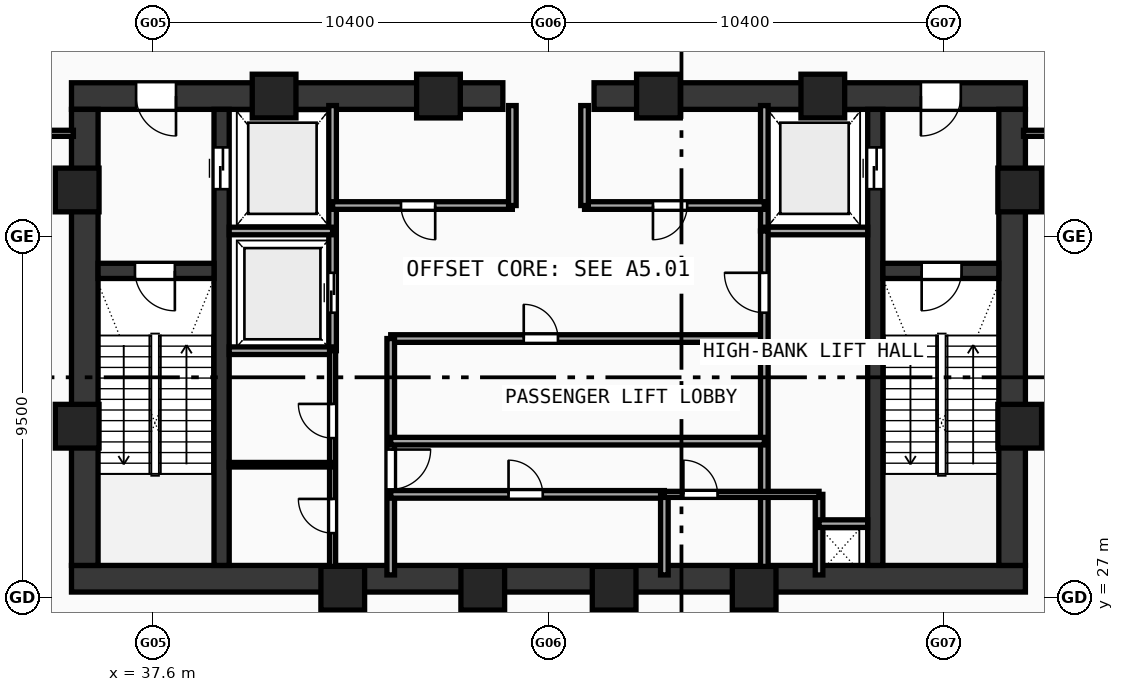
"""IFC4 building model, lengths in metres.
Left out: names, types, materials, properties, quantities, classifications, styles, units other than length and angle.
Written with IfcOpenShell. Run it as: python <this file> out.ifc"""

import sys

from ifc_helpers import new_model, si_unit, direction, frame, frame_2d, origin, origin_with_axes, origin_2d, place, context, subcontext, project, spatial, rectangle, hollow_rectangle, extrude, source, transform, mapped, element, fill, save


model = new_model("IFC4")
c1 = context("Model", 3, precision=1e-05, world=origin(), true_north=direction((0.0, 1.0)))
c2 = subcontext(c1, "Body", "Model", "MODEL_VIEW")
j1 = project(units=[si_unit("LENGTHUNIT", "METRE"), si_unit("PLANEANGLEUNIT", "RADIAN")], contexts=[c1])
p1 = place(None, origin())
s1 = spatial("IfcSite", under=j1, at=p1, CompositionType="ELEMENT")
p2 = place(p1, origin())
s2 = spatial("IfcBuilding", under=s1, at=p2, CompositionType="ELEMENT")
p3 = place(p2, frame((0.0, 0.0, -4.8)))
s3 = spatial("IfcBuildingStorey", under=s2, at=p3, CompositionType="ELEMENT", Elevation=-4.8)
p4 = place(p3, frame((35.45, 27.5, 0.0), z_axis=(0.0, 0.0, 1.0), x_axis=(1.0, 0.0, 0.0)))
e1 = element("IfcWall", 1, at=p4, inside=s3, PredefinedType="SHEAR", context=c2, shape_type="SweptSolid", body=[
    extrude(rectangle(XDim=25.1, YDim=0.7, at=frame_2d((12.55, 0.0))), origin(), (0.0, 0.0, 1.0), 4.52),
])
p5 = place(p3, frame((35.45, 40.2, 0.0), z_axis=(0.0, 0.0, 1.0), x_axis=(1.0, 0.0, 0.0)))
e2 = element("IfcWall", 2, at=p5, inside=s3, PredefinedType="SHEAR", context=c2, shape_type="SweptSolid", body=[
    extrude(rectangle(XDim=11.35, YDim=0.7, at=frame_2d((5.675, 0.0))), origin(), (0.0, 0.0, 1.0), 4.52),
])
p6 = place(p5, frame((1.7, 0.0, 0.0)))
e3 = element("IfcOpeningElement", 3, at=p6, cuts=e2, PredefinedType="OPENING", context=c2, shape_type="SweptSolid", body=[
    extrude(rectangle(XDim=1.05, YDim=2.1, at=frame_2d((0.525, 1.05))), frame((0.0, 0.36, 0.0), z_axis=(0.0, -1.0, 0.0), x_axis=(1.0, 0.0, 0.0)), (0.0, 0.0, 1.0), 0.72),
])
p7 = place(p3, frame((49.2, 40.2, 0.0), z_axis=(0.0, 0.0, 1.0), x_axis=(1.0, 0.0, 0.0)))
e4 = element("IfcWall", 4, at=p7, inside=s3, PredefinedType="SHEAR", context=c2, shape_type="SweptSolid", body=[
    extrude(rectangle(XDim=11.35, YDim=0.7, at=frame_2d((5.675, 0.0))), origin(), (0.0, 0.0, 1.0), 4.52),
])
p8 = place(p7, frame((8.6, 0.0, 0.0)))
e5 = element("IfcOpeningElement", 5, at=p8, cuts=e4, PredefinedType="OPENING", context=c2, shape_type="SweptSolid", body=[
    extrude(rectangle(XDim=1.05, YDim=2.1, at=frame_2d((0.525, 1.05))), frame((0.0, 0.36, 0.0), z_axis=(0.0, -1.0, 0.0), x_axis=(1.0, 0.0, 0.0)), (0.0, 0.0, 1.0), 0.72),
])
for number, where, z_axis, x_axis in (
    (6, (35.8, 27.85, 0.0), (0.0, 0.0, 1.0), (0.0, 1.0, 0.0)),
    (7, (60.2, 27.85, 0.0), (0.0, 0.0, 1.0), (0.0, 1.0, 0.0)),
):
    element("IfcWall", number, at=place(p3, frame(where, z_axis=z_axis, x_axis=x_axis)), inside=s3, PredefinedType="SHEAR", context=c2, shape_type="SweptSolid", body=[
        extrude(rectangle(XDim=12.0, YDim=0.7, at=frame_2d((6.0, 0.0))), origin(), (0.0, 0.0, 1.0), 4.52),
    ])
p9 = place(p3, frame((39.4, 27.85, 0.0), z_axis=(0.0, 0.0, 1.0), x_axis=(0.0, 1.0, 0.0)))
e8 = element("IfcWall", 8, at=p9, inside=s3, PredefinedType="SHEAR", context=c2, shape_type="SweptSolid", body=[
    extrude(rectangle(XDim=12.0, YDim=0.4, at=frame_2d((6.0, 0.0))), origin(), (0.0, 0.0, 1.0), 4.52),
])
p10 = place(p9, frame((9.9, 0.0, 0.0)))
e9 = element("IfcOpeningElement", 9, at=p10, cuts=e8, PredefinedType="OPENING", context=c2, shape_type="SweptSolid", body=[
    extrude(rectangle(XDim=1.1, YDim=2.1, at=frame_2d((0.55, 1.05))), frame((0.0, 0.21, 0.0), z_axis=(0.0, -1.0, 0.0), x_axis=(1.0, 0.0, 0.0)), (0.0, 0.0, 1.0), 0.42),
])
p11 = place(p3, frame((56.6, 27.85, 0.0), z_axis=(0.0, 0.0, 1.0), x_axis=(0.0, 1.0, 0.0)))
e10 = element("IfcWall", 10, at=p11, inside=s3, PredefinedType="SHEAR", context=c2, shape_type="SweptSolid", body=[
    extrude(rectangle(XDim=12.0, YDim=0.4, at=frame_2d((6.0, 0.0))), origin(), (0.0, 0.0, 1.0), 4.52),
])
p12 = place(p11, frame((9.9, 0.0, 0.0)))
e11 = element("IfcOpeningElement", 11, at=p12, cuts=e10, PredefinedType="OPENING", context=c2, shape_type="SweptSolid", body=[
    extrude(rectangle(XDim=1.1, YDim=2.1, at=frame_2d((0.55, 1.05))), frame((0.0, 0.21, 0.0), z_axis=(0.0, -1.0, 0.0), x_axis=(1.0, 0.0, 0.0)), (0.0, 0.0, 1.0), 0.42),
])
p13 = place(p3, frame((36.15, 35.6, 0.0), z_axis=(0.0, 0.0, 1.0), x_axis=(1.0, 0.0, 0.0)))
e12 = element("IfcWall", 12, at=p13, inside=s3, PredefinedType="SHEAR", context=c2, shape_type="SweptSolid", body=[
    extrude(rectangle(XDim=3.05, YDim=0.4, at=frame_2d((1.525, 0.0))), origin(), (0.0, 0.0, 1.0), 4.52),
])
p14 = place(p13, frame((0.97, 0.0, 0.0)))
e13 = element("IfcOpeningElement", 13, at=p14, cuts=e12, PredefinedType="OPENING", context=c2, shape_type="SweptSolid", body=[
    extrude(rectangle(XDim=1.05, YDim=2.1, at=frame_2d((0.525, 1.05))), frame((0.0, 0.21, 0.0), z_axis=(0.0, -1.0, 0.0), x_axis=(1.0, 0.0, 0.0)), (0.0, 0.0, 1.0), 0.42),
])
p15 = place(p3, frame((56.8, 35.6, 0.0), z_axis=(0.0, 0.0, 1.0), x_axis=(1.0, 0.0, 0.0)))
e14 = element("IfcWall", 14, at=p15, inside=s3, PredefinedType="SHEAR", context=c2, shape_type="SweptSolid", body=[
    extrude(rectangle(XDim=3.05, YDim=0.4, at=frame_2d((1.525, 0.0))), origin(), (0.0, 0.0, 1.0), 4.52),
])
p16 = place(p15, frame((1.02, 0.0, 0.0)))
e15 = element("IfcOpeningElement", 15, at=p16, cuts=e14, PredefinedType="OPENING", context=c2, shape_type="SweptSolid", body=[
    extrude(rectangle(XDim=1.05, YDim=2.1, at=frame_2d((0.525, 1.05))), frame((0.0, 0.21, 0.0), z_axis=(0.0, -1.0, 0.0), x_axis=(1.0, 0.0, 0.0)), (0.0, 0.0, 1.0), 0.42),
])
m1 = source(origin(), c2, "Body", "SweptSolid", [
    extrude(hollow_rectangle(XDim=1.15, YDim=1.15, WallThickness=0.048, at=origin_2d()), origin(), (0.0, 0.0, 1.0), 4.82),
])
for number, where, z_axis, x_axis in (
    (16, (42.588, 27.25, -0.3), (0.0, 0.0, 1.0), (1.0, 0.0, 0.0)),
    (17, (46.272, 27.25, -0.3), (0.0, 0.0, 1.0), (1.0, 0.0, 0.0)),
    (18, (49.729, 27.25, -0.3), (0.0, 0.0, 1.0), (1.0, 0.0, 0.0)),
    (19, (53.412, 27.25, -0.3), (0.0, 0.0, 1.0), (1.0, 0.0, 0.0)),
    (20, (60.4, 31.513, -0.3), (0.0, 0.0, 1.0), (1.0, 0.0, 0.0)),
    (21, (60.4, 37.729, -0.3), (0.0, 0.0, 1.0), (1.0, 0.0, 0.0)),
    (22, (55.219, 40.2, -0.3), (0.0, 0.0, 1.0), (1.0, 0.0, 0.0)),
    (23, (50.894, 40.2, -0.3), (0.0, 0.0, 1.0), (1.0, 0.0, 0.0)),
    (24, (45.106, 40.2, -0.3), (0.0, 0.0, 1.0), (1.0, 0.0, 0.0)),
    (25, (40.781, 40.2, -0.3), (0.0, 0.0, 1.0), (1.0, 0.0, 0.0)),
    (26, (35.6, 37.729, -0.3), (0.0, 0.0, 1.0), (1.0, 0.0, 0.0)),
    (27, (35.6, 31.513, -0.3), (0.0, 0.0, 1.0), (1.0, 0.0, 0.0)),
):
    element("IfcColumn", number, at=place(p3, frame(where, z_axis=z_axis, x_axis=x_axis)), inside=s3, PredefinedType="COLUMN", context=c2, shape_type="MappedRepresentation", body=[
        mapped(m1, transform((0.0, 0.0, 0.0), scale=1.0)),
    ])
p17 = place(p3, frame((42.32, 33.5, 0.0), z_axis=(0.0, 0.0, 1.0), x_axis=(0.0, 1.0, 0.0)))
e28 = element("IfcWall", 28, at=p17, inside=s3, PredefinedType="SOLIDWALL", context=c2, shape_type="SweptSolid", body=[
    extrude(rectangle(XDim=6.45, YDim=0.2, at=frame_2d((3.225, 0.0))), origin(), (0.0, 0.0, 1.0), 4.52),
])
p18 = place(p17, frame((1.0, 0.0, 0.0)))
e29 = element("IfcOpeningElement", 29, at=p18, cuts=e28, PredefinedType="OPENING", context=c2, shape_type="SweptSolid", body=[
    extrude(rectangle(XDim=1.05, YDim=2.1, at=frame_2d((0.525, 1.05))), frame((0.0, 0.11, 0.0), z_axis=(0.0, -1.0, 0.0), x_axis=(1.0, 0.0, 0.0)), (0.0, 0.0, 1.0), 0.22),
])
for number, where, z_axis, x_axis in (
    (30, (39.6, 36.65, 0.0), (0.0, 0.0, 1.0), (1.0, 0.0, 0.0)),
    (31, (39.6, 33.5, 0.0), (0.0, 0.0, 1.0), (1.0, 0.0, 0.0)),
):
    element("IfcWall", number, at=place(p3, frame(where, z_axis=z_axis, x_axis=x_axis)), inside=s3, PredefinedType="SOLIDWALL", context=c2, shape_type="SweptSolid", body=[
        extrude(rectangle(XDim=2.72, YDim=0.2, at=frame_2d((1.36, 0.0))), origin(), (0.0, 0.0, 1.0), 4.52),
    ])
p19 = place(p3, frame((53.68, 36.65, 0.0), z_axis=(0.0, 0.0, 1.0), x_axis=(0.0, 1.0, 0.0)))
e32 = element("IfcWall", 32, at=p19, inside=s3, PredefinedType="SOLIDWALL", context=c2, shape_type="SweptSolid", body=[
    extrude(rectangle(XDim=3.3, YDim=0.2, at=frame_2d((1.65, 0.0))), origin(), (0.0, 0.0, 1.0), 4.52),
])
p20 = place(p3, frame((53.68, 36.65, 0.0), z_axis=(0.0, 0.0, 1.0), x_axis=(1.0, 0.0, 0.0)))
e33 = element("IfcWall", 33, at=p20, inside=s3, PredefinedType="SOLIDWALL", context=c2, shape_type="SweptSolid", body=[
    extrude(rectangle(XDim=2.72, YDim=0.2, at=frame_2d((1.36, 0.0))), origin(), (0.0, 0.0, 1.0), 4.52),
])
p21 = place(p3, frame((42.32, 37.32, 0.0), z_axis=(0.0, 0.0, 1.0), x_axis=(1.0, 0.0, 0.0)))
e34 = element("IfcWall", 34, at=p21, inside=s3, PredefinedType="SOLIDWALL", context=c2, shape_type="SweptSolid", body=[
    extrude(rectangle(XDim=4.73, YDim=0.2, at=frame_2d((2.365, 0.0))), origin(), (0.0, 0.0, 1.0), 4.52),
])
p22 = place(p21, frame((1.8, 0.0, 0.0)))
e35 = element("IfcOpeningElement", 35, at=p22, cuts=e34, PredefinedType="OPENING", context=c2, shape_type="SweptSolid", body=[
    extrude(rectangle(XDim=0.9, YDim=2.1, at=frame_2d((0.45, 1.05))), frame((0.0, 0.11, 0.0), z_axis=(0.0, -1.0, 0.0), x_axis=(1.0, 0.0, 0.0)), (0.0, 0.0, 1.0), 0.22),
])
p23 = place(p3, frame((48.95, 37.32, 0.0), z_axis=(0.0, 0.0, 1.0), x_axis=(1.0, 0.0, 0.0)))
e36 = element("IfcWall", 36, at=p23, inside=s3, PredefinedType="SOLIDWALL", context=c2, shape_type="SweptSolid", body=[
    extrude(rectangle(XDim=4.73, YDim=0.2, at=frame_2d((2.365, 0.0))), origin(), (0.0, 0.0, 1.0), 4.52),
])
p24 = place(p23, frame((1.8, 0.0, 0.0)))
e37 = element("IfcOpeningElement", 37, at=p24, cuts=e36, PredefinedType="OPENING", context=c2, shape_type="SweptSolid", body=[
    extrude(rectangle(XDim=0.9, YDim=2.1, at=frame_2d((0.45, 1.05))), frame((0.0, 0.11, 0.0), z_axis=(0.0, -1.0, 0.0), x_axis=(1.0, 0.0, 0.0)), (0.0, 0.0, 1.0), 0.22),
])
for number, where, z_axis, x_axis in (
    (38, (47.05, 37.32, 0.0), (0.0, 0.0, 1.0), (0.0, 1.0, 0.0)),
    (39, (48.95, 37.32, 0.0), (0.0, 0.0, 1.0), (0.0, 1.0, 0.0)),
):
    element("IfcWall", number, at=place(p3, frame(where, z_axis=z_axis, x_axis=x_axis)), inside=s3, PredefinedType="SOLIDWALL", context=c2, shape_type="SweptSolid", body=[
        extrude(rectangle(XDim=2.63, YDim=0.2, at=frame_2d((1.315, 0.0))), origin(), (0.0, 0.0, 1.0), 4.52),
    ])
p25 = place(p3, frame((43.85, 33.82, 0.0), z_axis=(0.0, 0.0, 1.0), x_axis=(1.0, 0.0, 0.0)))
e40 = element("IfcWall", 40, at=p25, inside=s3, PredefinedType="SOLIDWALL", context=c2, shape_type="SweptSolid", body=[
    extrude(rectangle(XDim=9.83, YDim=0.2, at=frame_2d((4.915, 0.0))), origin(), (0.0, 0.0, 1.0), 4.52),
])
p26 = place(p25, frame((3.5, 0.0, 0.0)))
e41 = element("IfcOpeningElement", 41, at=p26, cuts=e40, PredefinedType="OPENING", context=c2, shape_type="SweptSolid", body=[
    extrude(rectangle(XDim=0.9, YDim=2.1, at=frame_2d((0.45, 1.05))), frame((0.0, 0.11, 0.0), z_axis=(0.0, -1.0, 0.0), x_axis=(1.0, 0.0, 0.0)), (0.0, 0.0, 1.0), 0.22),
])
p27 = place(p3, frame((43.85, 27.6, 0.0), z_axis=(0.0, 0.0, 1.0), x_axis=(0.0, 1.0, 0.0)))
e42 = element("IfcWall", 42, at=p27, inside=s3, PredefinedType="SOLIDWALL", context=c2, shape_type="SweptSolid", body=[
    extrude(rectangle(XDim=6.22, YDim=0.2, at=frame_2d((3.11, 0.0))), origin(), (0.0, 0.0, 1.0), 4.52),
])
p28 = place(p27, frame((2.25, 0.0, 0.0)))
e43 = element("IfcOpeningElement", 43, at=p28, cuts=e42, PredefinedType="OPENING", context=c2, shape_type="SweptSolid", body=[
    extrude(rectangle(XDim=1.05, YDim=2.1, at=frame_2d((0.525, 1.05))), frame((0.0, 0.11, 0.0), z_axis=(0.0, -1.0, 0.0), x_axis=(1.0, 0.0, 0.0)), (0.0, 0.0, 1.0), 0.22),
])
p29 = place(p3, frame((53.68, 27.6, 0.0), z_axis=(0.0, 0.0, 1.0), x_axis=(0.0, 1.0, 0.0)))
e44 = element("IfcWall", 44, at=p29, inside=s3, PredefinedType="SOLIDWALL", context=c2, shape_type="SweptSolid", body=[
    extrude(rectangle(XDim=9.05, YDim=0.2, at=frame_2d((4.525, 0.0))), origin(), (0.0, 0.0, 1.0), 4.52),
])
p30 = place(p29, frame((6.9, 0.0, 0.0)))
e45 = element("IfcOpeningElement", 45, at=p30, cuts=e44, PredefinedType="OPENING", context=c2, shape_type="SweptSolid", body=[
    extrude(rectangle(XDim=1.05, YDim=2.1, at=frame_2d((0.525, 1.05))), frame((0.0, 0.11, 0.0), z_axis=(0.0, -1.0, 0.0), x_axis=(1.0, 0.0, 0.0)), (0.0, 0.0, 1.0), 0.22),
])
p31 = place(p3, frame((43.85, 29.72, 0.0), z_axis=(0.0, 0.0, 1.0), x_axis=(1.0, 0.0, 0.0)))
e46 = element("IfcWall", 46, at=p31, inside=s3, PredefinedType="SOLIDWALL", context=c2, shape_type="SweptSolid", body=[
    extrude(rectangle(XDim=7.2, YDim=0.2, at=frame_2d((3.6, 0.0))), origin(), (0.0, 0.0, 1.0), 4.52),
])
p32 = place(p31, frame((3.1, 0.0, 0.0)))
e47 = element("IfcOpeningElement", 47, at=p32, cuts=e46, PredefinedType="OPENING", context=c2, shape_type="SweptSolid", body=[
    extrude(rectangle(XDim=0.9, YDim=2.1, at=frame_2d((0.45, 1.05))), frame((0.0, 0.11, 0.0), z_axis=(0.0, -1.0, 0.0), x_axis=(1.0, 0.0, 0.0)), (0.0, 0.0, 1.0), 0.22),
])
p33 = place(p3, frame((51.05, 27.6, 0.0), z_axis=(0.0, 0.0, 1.0), x_axis=(0.0, 1.0, 0.0)))
e48 = element("IfcWall", 48, at=p33, inside=s3, PredefinedType="SOLIDWALL", context=c2, shape_type="SweptSolid", body=[
    extrude(rectangle(XDim=2.12, YDim=0.2, at=frame_2d((1.06, 0.0))), origin(), (0.0, 0.0, 1.0), 4.52),
])
p34 = place(p3, frame((43.85, 31.12, 0.0), z_axis=(0.0, 0.0, 1.0), x_axis=(1.0, 0.0, 0.0)))
e49 = element("IfcWall", 49, at=p34, inside=s3, PredefinedType="SOLIDWALL", context=c2, shape_type="SweptSolid", body=[
    extrude(rectangle(XDim=9.83, YDim=0.2, at=frame_2d((4.915, 0.0))), origin(), (0.0, 0.0, 1.0), 4.52),
])
p35 = place(p3, frame((55.12, 27.6, 0.0), z_axis=(0.0, 0.0, 1.0), x_axis=(0.0, 1.0, 0.0)))
e50 = element("IfcWall", 50, at=p35, inside=s3, PredefinedType="SOLIDWALL", context=c2, shape_type="SweptSolid", body=[
    extrude(rectangle(XDim=2.12, YDim=0.2, at=frame_2d((1.06, 0.0))), origin(), (0.0, 0.0, 1.0), 4.52),
])
p36 = place(p3, frame((55.12, 28.95, 0.0), z_axis=(0.0, 0.0, 1.0), x_axis=(1.0, 0.0, 0.0)))
e51 = element("IfcWall", 51, at=p36, inside=s3, PredefinedType="SOLIDWALL", context=c2, shape_type="SweptSolid", body=[
    extrude(rectangle(XDim=1.28, YDim=0.2, at=frame_2d((0.64, 0.0))), origin(), (0.0, 0.0, 1.0), 4.52),
])
p37 = place(p3, frame((42.32, 27.6, 0.0), z_axis=(0.0, 0.0, 1.0), x_axis=(0.0, 1.0, 0.0)))
e52 = element("IfcWall", 52, at=p37, inside=s3, PredefinedType="PARTITIONING", context=c2, shape_type="SweptSolid", body=[
    extrude(rectangle(XDim=5.9, YDim=0.16, at=frame_2d((2.95, 0.0))), origin(), (0.0, 0.0, 1.0), 4.52),
])
p38 = place(p37, frame((1.1, 0.0, 0.0)))
e53 = element("IfcOpeningElement", 53, at=p38, cuts=e52, PredefinedType="OPENING", context=c2, shape_type="SweptSolid", body=[
    extrude(rectangle(XDim=0.9, YDim=2.1, at=frame_2d((0.45, 1.05))), frame((0.0, 0.09, 0.0), z_axis=(0.0, -1.0, 0.0), x_axis=(1.0, 0.0, 0.0)), (0.0, 0.0, 1.0), 0.18),
])
p39 = place(p37, frame((3.6, 0.0, 0.0)))
e54 = element("IfcOpeningElement", 54, at=p39, cuts=e52, PredefinedType="OPENING", context=c2, shape_type="SweptSolid", body=[
    extrude(rectangle(XDim=0.9, YDim=2.1, at=frame_2d((0.45, 1.05))), frame((0.0, 0.09, 0.0), z_axis=(0.0, -1.0, 0.0), x_axis=(1.0, 0.0, 0.0)), (0.0, 0.0, 1.0), 0.18),
])
p40 = place(p3, frame((51.05, 29.72, 0.0), z_axis=(0.0, 0.0, 1.0), x_axis=(1.0, 0.0, 0.0)))
e55 = element("IfcWall", 55, at=p40, inside=s3, PredefinedType="PARTITIONING", context=c2, shape_type="SweptSolid", body=[
    extrude(rectangle(XDim=4.07, YDim=0.16, at=frame_2d((2.035, 0.0))), origin(), (0.0, 0.0, 1.0), 4.52),
])
p41 = place(p40, frame((0.5, 0.0, 0.0)))
e56 = element("IfcOpeningElement", 56, at=p41, cuts=e55, PredefinedType="OPENING", context=c2, shape_type="SweptSolid", body=[
    extrude(rectangle(XDim=0.9, YDim=2.1, at=frame_2d((0.45, 1.05))), frame((0.0, 0.09, 0.0), z_axis=(0.0, -1.0, 0.0), x_axis=(1.0, 0.0, 0.0)), (0.0, 0.0, 1.0), 0.18),
])
p42 = place(p3, frame((39.6, 30.5, 0.0), z_axis=(0.0, 0.0, 1.0), x_axis=(1.0, 0.0, 0.0)))
e57 = element("IfcWall", 57, at=p42, inside=s3, PredefinedType="PARTITIONING", context=c2, shape_type="SweptSolid", body=[
    extrude(rectangle(XDim=2.72, YDim=0.12, at=frame_2d((1.36, 0.0))), origin(), (0.0, 0.0, 1.0), 4.52),
])
for number, where, z_axis, x_axis in (
    (58, (32.7, 39.22, 0.0), (0.0, 0.0, 1.0), (1.0, 0.0, 0.0)),
    (59, (60.5, 39.22, 0.0), (0.0, 0.0, 1.0), (1.0, 0.0, 0.0)),
):
    element("IfcWall", number, at=place(p3, frame(where, z_axis=z_axis, x_axis=x_axis)), inside=s3, PredefinedType="PARTITIONING", context=c2, shape_type="SweptSolid", body=[
        extrude(rectangle(XDim=2.8, YDim=0.16, at=frame_2d((1.4, 0.0))), origin(), (0.0, 0.0, 1.0), 3.62),
    ])
m2 = source(origin(), c2, "Body", "SweptSolid", [
    extrude(rectangle(XDim=1.05, YDim=2.1, at=frame_2d((0.525, 1.05))), frame((0.0, 0.025, 0.0), z_axis=(0.0, -1.0, 0.0), x_axis=(1.0, 0.0, 0.0)), (0.0, 0.0, 1.0), 0.05),
])
p43 = place(p14, frame((1.05, 0.0, 0.0), z_axis=(0.0, 0.0, 1.0), x_axis=(-1.0, 0.0, 0.0)))
e60 = element("IfcDoor", 60, at=p43, inside=s3, OperationType="SINGLE_SWING_LEFT", PredefinedType="DOOR", context=c2, shape_type="MappedRepresentation", body=[
    mapped(m2, transform((0.0, 0.0, 0.0), scale=1.0)),
])
fill(e13, e60)
p44 = place(p16, frame((1.05, 0.0, 0.0), z_axis=(0.0, 0.0, 1.0), x_axis=(-1.0, 0.0, 0.0)))
e61 = element("IfcDoor", 61, at=p44, inside=s3, OperationType="SINGLE_SWING_RIGHT", PredefinedType="DOOR", context=c2, shape_type="MappedRepresentation", body=[
    mapped(m2, transform((0.0, 0.0, 0.0), scale=1.0)),
])
fill(e15, e61)
p45 = place(p6, frame((1.05, 0.0, 0.0), z_axis=(0.0, 0.0, 1.0), x_axis=(-1.0, 0.0, 0.0)))
e62 = element("IfcDoor", 62, at=p45, inside=s3, OperationType="SINGLE_SWING_LEFT", PredefinedType="DOOR", context=c2, shape_type="MappedRepresentation", body=[
    mapped(m2, transform((0.0, 0.0, 0.0), scale=1.0)),
])
fill(e3, e62)
p46 = place(p8, frame((1.05, 0.0, 0.0), z_axis=(0.0, 0.0, 1.0), x_axis=(-1.0, 0.0, 0.0)))
e63 = element("IfcDoor", 63, at=p46, inside=s3, OperationType="SINGLE_SWING_RIGHT", PredefinedType="DOOR", context=c2, shape_type="MappedRepresentation", body=[
    mapped(m2, transform((0.0, 0.0, 0.0), scale=1.0)),
])
fill(e5, e63)
m3 = source(origin(), c2, "Body", "SweptSolid", [
    extrude(rectangle(XDim=1.1, YDim=2.1, at=frame_2d((0.55, 1.05))), frame((0.0, 0.025, 0.0), z_axis=(0.0, -1.0, 0.0), x_axis=(1.0, 0.0, 0.0)), (0.0, 0.0, 1.0), 0.05),
])
p47 = place(p10, frame((1.1, 0.0, 0.0), z_axis=(0.0, 0.0, 1.0), x_axis=(-1.0, 0.0, 0.0)))
e64 = element("IfcDoor", 64, at=p47, inside=s3, OperationType="DOUBLE_DOOR_SLIDING", PredefinedType="DOOR", context=c2, shape_type="MappedRepresentation", body=[
    mapped(m3, transform((0.0, 0.0, 0.0), scale=1.0)),
])
fill(e9, e64)
p48 = place(p12, origin_with_axes())
e65 = element("IfcDoor", 65, at=p48, inside=s3, OperationType="DOUBLE_DOOR_SLIDING", PredefinedType="DOOR", context=c2, shape_type="MappedRepresentation", body=[
    mapped(m3, transform((0.0, 0.0, 0.0), scale=1.0)),
])
fill(e11, e65)
p49 = place(p18, origin_with_axes())
e66 = element("IfcDoor", 66, at=p49, inside=s3, OperationType="DOUBLE_DOOR_SLIDING", PredefinedType="DOOR", context=c2, shape_type="MappedRepresentation", body=[
    mapped(m2, transform((0.0, 0.0, 0.0), scale=1.0)),
])
fill(e29, e66)
m4 = source(origin(), c2, "Body", "SweptSolid", [
    extrude(rectangle(XDim=0.9, YDim=2.1, at=frame_2d((0.45, 1.05))), frame((0.0, 0.025, 0.0), z_axis=(0.0, -1.0, 0.0), x_axis=(1.0, 0.0, 0.0)), (0.0, 0.0, 1.0), 0.05),
])
p50 = place(p22, frame((0.9, 0.0, 0.0), z_axis=(0.0, 0.0, 1.0), x_axis=(-1.0, 0.0, 0.0)))
e67 = element("IfcDoor", 67, at=p50, inside=s3, OperationType="SINGLE_SWING_LEFT", PredefinedType="DOOR", context=c2, shape_type="MappedRepresentation", body=[
    mapped(m4, transform((0.0, 0.0, 0.0), scale=1.0)),
])
fill(e35, e67)
p51 = place(p24, frame((0.9, 0.0, 0.0), z_axis=(0.0, 0.0, 1.0), x_axis=(-1.0, 0.0, 0.0)))
e68 = element("IfcDoor", 68, at=p51, inside=s3, OperationType="SINGLE_SWING_RIGHT", PredefinedType="DOOR", context=c2, shape_type="MappedRepresentation", body=[
    mapped(m4, transform((0.0, 0.0, 0.0), scale=1.0)),
])
fill(e37, e68)
p52 = place(p26, origin_with_axes())
e69 = element("IfcDoor", 69, at=p52, inside=s3, OperationType="SINGLE_SWING_LEFT", PredefinedType="DOOR", context=c2, shape_type="MappedRepresentation", body=[
    mapped(m4, transform((0.0, 0.0, 0.0), scale=1.0)),
])
fill(e41, e69)
p53 = place(p28, frame((1.05, 0.0, 0.0), z_axis=(0.0, 0.0, 1.0), x_axis=(-1.0, 0.0, 0.0)))
e70 = element("IfcDoor", 70, at=p53, inside=s3, OperationType="SINGLE_SWING_LEFT", PredefinedType="DOOR", context=c2, shape_type="MappedRepresentation", body=[
    mapped(m2, transform((0.0, 0.0, 0.0), scale=1.0)),
])
fill(e43, e70)
p54 = place(p30, origin_with_axes())
e71 = element("IfcDoor", 71, at=p54, inside=s3, OperationType="SINGLE_SWING_RIGHT", PredefinedType="DOOR", context=c2, shape_type="MappedRepresentation", body=[
    mapped(m2, transform((0.0, 0.0, 0.0), scale=1.0)),
])
fill(e45, e71)
p55 = place(p32, origin_with_axes())
e72 = element("IfcDoor", 72, at=p55, inside=s3, OperationType="SINGLE_SWING_LEFT", PredefinedType="DOOR", context=c2, shape_type="MappedRepresentation", body=[
    mapped(m4, transform((0.0, 0.0, 0.0), scale=1.0)),
])
fill(e47, e72)
p56 = place(p38, origin_with_axes())
e73 = element("IfcDoor", 73, at=p56, inside=s3, OperationType="SINGLE_SWING_RIGHT", PredefinedType="DOOR", context=c2, shape_type="MappedRepresentation", body=[
    mapped(m4, transform((0.0, 0.0, 0.0), scale=1.0)),
])
fill(e53, e73)
p57 = place(p39, origin_with_axes())
e74 = element("IfcDoor", 74, at=p57, inside=s3, OperationType="SINGLE_SWING_RIGHT", PredefinedType="DOOR", context=c2, shape_type="MappedRepresentation", body=[
    mapped(m4, transform((0.0, 0.0, 0.0), scale=1.0)),
])
fill(e54, e74)
p58 = place(p41, origin_with_axes())
e75 = element("IfcDoor", 75, at=p58, inside=s3, OperationType="SINGLE_SWING_LEFT", PredefinedType="DOOR", context=c2, shape_type="MappedRepresentation", body=[
    mapped(m4, transform((0.0, 0.0, 0.0), scale=1.0)),
])
fill(e56, e75)
save(model, sys.argv[1])
